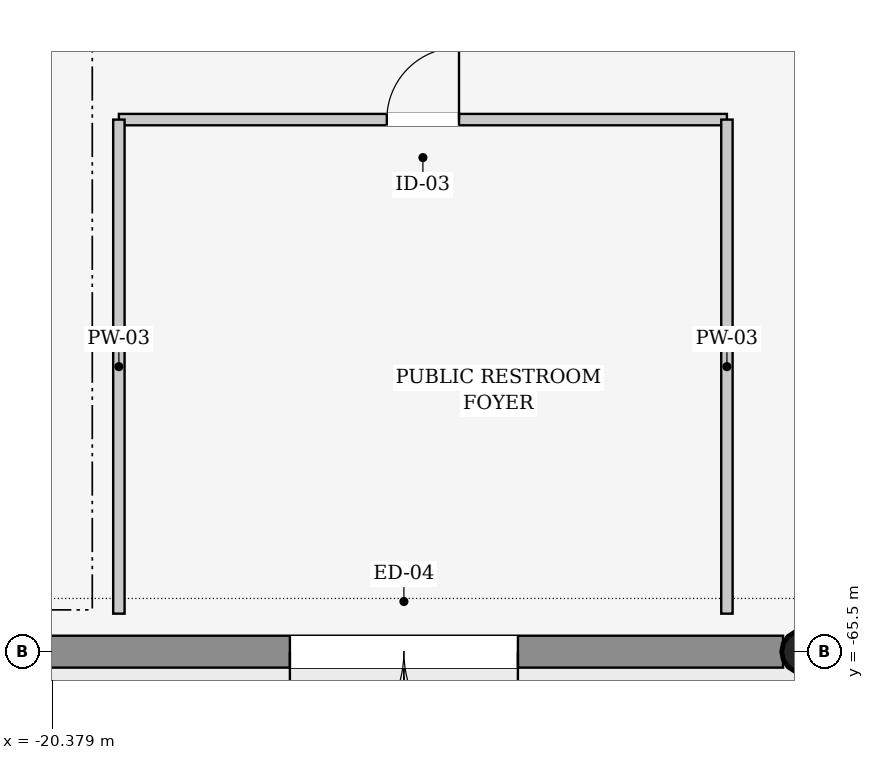
"""IFC4 building model, lengths in metres.
Left out: names, types, materials, properties, quantities, classifications, styles, units other than length and angle.
Written with IfcOpenShell. Run it as: python <this file> out.ifc"""

import sys

from ifc_helpers import new_model, si_unit, direction, frame, frame_2d, origin, origin_2d, place, context, subcontext, project, spatial, rectangle, hollow_circle, extrude, element, fill, save


model = new_model("IFC4")
c1 = context("Model", 3, precision=1e-05, world=origin(), true_north=direction((0.0, 1.0)))
c2 = subcontext(c1, "Body", "Model", "MODEL_VIEW")
j1 = project(units=[si_unit("LENGTHUNIT", "METRE"), si_unit("PLANEANGLEUNIT", "RADIAN")], contexts=[c1])
p1 = place(None, origin())
s1 = spatial("IfcSite", under=j1, at=p1, CompositionType="ELEMENT")
p2 = place(p1, origin())
s2 = spatial("IfcBuilding", under=s1, at=p2, CompositionType="ELEMENT")
p3 = place(p2, origin())
s3 = spatial("IfcBuildingStorey", under=s2, at=p3, CompositionType="ELEMENT", Elevation=0.0)
p4 = place(p3, frame((-10.5, -65.5, 0.0), z_axis=(0.0, 0.0, 1.0), x_axis=(1.0, 0.0, 0.0)))
e1 = element("IfcColumn", 1, at=p4, inside=s3, PredefinedType="COLUMN", context=c2, shape_type="SweptSolid", body=[
    extrude(hollow_circle(Radius=0.28, WallThickness=0.02, at=origin_2d()), origin(), (0.0, 0.0, 1.0), 6.0),
])
p5 = place(p3, frame((-10.761, -65.5, 0.0), z_axis=(0.0, 0.0, 1.0), x_axis=(-1.0, 0.0, 0.0)))
e2 = element("IfcWall", 2, at=p5, inside=s3, PredefinedType="SOLIDWALL", context=c2, shape_type="SweptSolid", body=[
    extrude(rectangle(XDim=9.977, YDim=0.42, at=frame_2d((4.989, 0.0))), origin(), (0.0, 0.0, 1.0), 4.74),
])
p6 = place(p5, frame((3.489, 0.0, 0.0)))
e3 = element("IfcOpeningElement", 3, at=p6, cuts=e2, PredefinedType="OPENING", context=c2, shape_type="SweptSolid", body=[
    extrude(rectangle(XDim=3.0, YDim=3.2, at=frame_2d((1.5, 1.6))), frame((0.0, 0.22, 0.0), z_axis=(0.0, -1.0, 0.0), x_axis=(1.0, 0.0, 0.0)), (0.0, 0.0, 1.0), 0.44),
])
p7 = place(p3, frame((-19.5, -58.5, 0.0), z_axis=(0.0, 0.0, 1.0), x_axis=(1.0, 0.0, 0.0)))
e4 = element("IfcWall", 4, at=p7, inside=s3, PredefinedType="PARTITIONING", context=c2, shape_type="SweptSolid", body=[
    extrude(rectangle(XDim=8.0, YDim=0.15, at=frame_2d((4.0, 0.0))), origin(), (0.0, 0.0, 1.0), 5.64),
])
p8 = place(p7, frame((3.525, 0.0, 0.0)))
e5 = element("IfcOpeningElement", 5, at=p8, cuts=e4, PredefinedType="OPENING", context=c2, shape_type="SweptSolid", body=[
    extrude(rectangle(XDim=0.95, YDim=2.15, at=frame_2d((0.475, 1.075))), frame((0.0, 0.085, 0.0), z_axis=(0.0, -1.0, 0.0), x_axis=(1.0, 0.0, 0.0)), (0.0, 0.0, 1.0), 0.17),
])
for number, where, z_axis, x_axis in (
    (6, (-11.5, -58.5, 0.0), (0.0, 0.0, 1.0), (0.0, -1.0, 0.0)),
    (7, (-19.5, -65.0, 0.0), (0.0, 0.0, 1.0), (0.0, 1.0, 0.0)),
):
    element("IfcWall", number, at=place(p3, frame(where, z_axis=z_axis, x_axis=x_axis)), inside=s3, PredefinedType="PARTITIONING", context=c2, shape_type="SweptSolid", body=[
        extrude(rectangle(XDim=6.5, YDim=0.15, at=frame_2d((3.25, 0.0))), origin(), (0.0, 0.0, 1.0), 4.825),
    ])
p9 = place(p6, origin())
e8 = element("IfcDoor", 8, at=p9, inside=s3, OperationType="DOUBLE_DOOR_SINGLE_SWING", PredefinedType="DOOR", context=c2, shape_type="SweptSolid", body=[
    extrude(rectangle(XDim=3.0, YDim=3.2, at=frame_2d((1.5, 1.6))), frame((0.0, 0.025, 0.0), z_axis=(0.0, -1.0, 0.0), x_axis=(1.0, 0.0, 0.0)), (0.0, 0.0, 1.0), 0.05),
])
fill(e3, e8)
p10 = place(p8, origin())
e9 = element("IfcDoor", 9, at=p10, inside=s3, OperationType="SINGLE_SWING_RIGHT", PredefinedType="DOOR", context=c2, shape_type="SweptSolid", body=[
    extrude(rectangle(XDim=0.95, YDim=2.15, at=frame_2d((0.475, 1.075))), frame((0.0, 0.025, 0.0), z_axis=(0.0, -1.0, 0.0), x_axis=(1.0, 0.0, 0.0)), (0.0, 0.0, 1.0), 0.05),
])
fill(e5, e9)
save(model, sys.argv[1])
